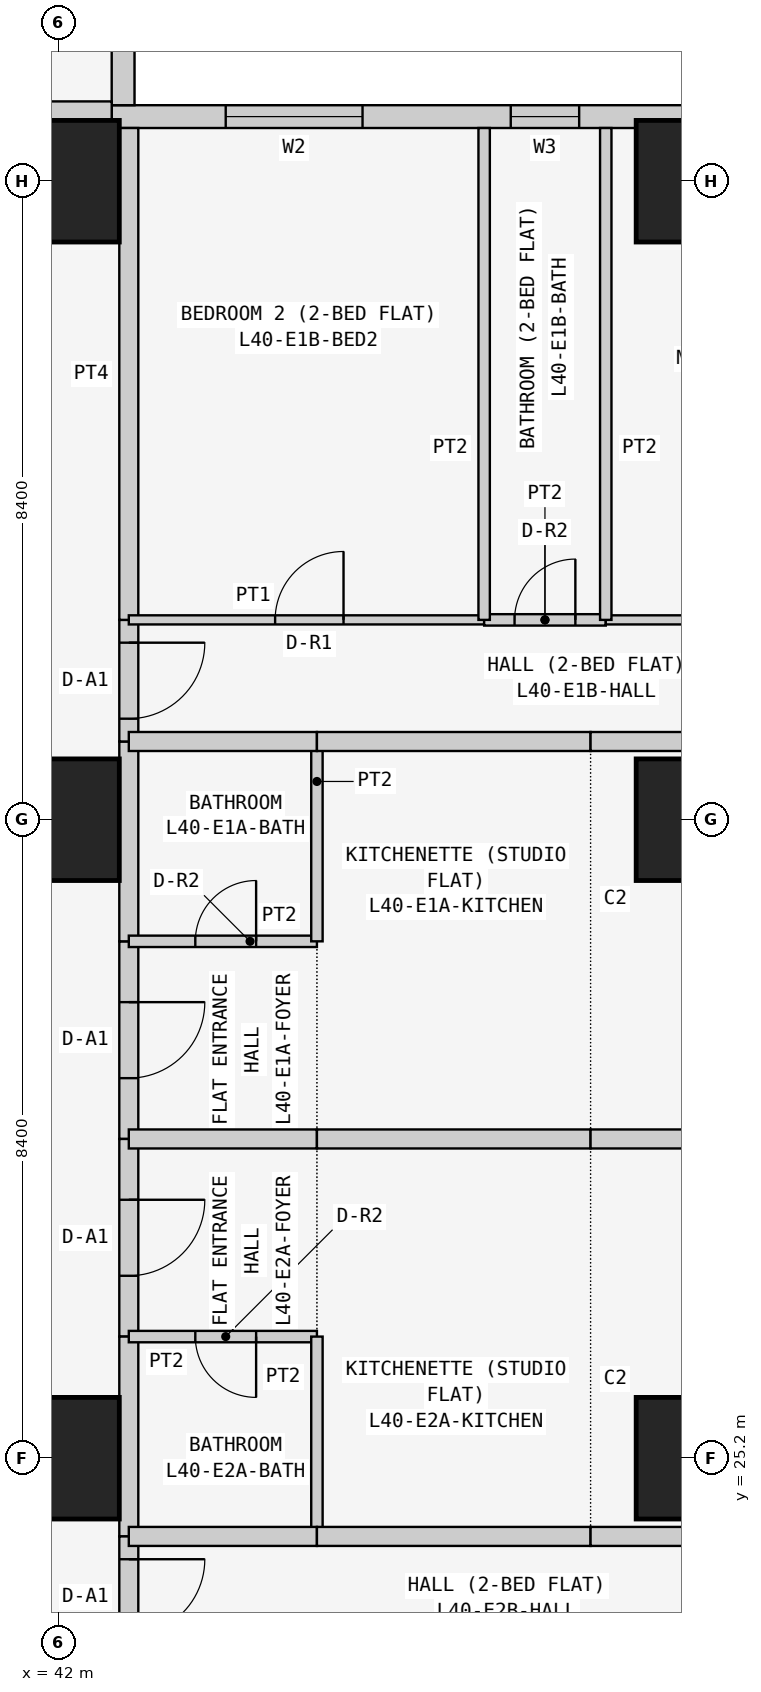
"""IFC4 building model, lengths in metres.
Left out: names, types, materials, properties, quantities, classifications, styles, units other than length and angle.
Written with IfcOpenShell. Run it as: python <this file> out.ifc"""

import sys

from ifc_helpers import new_model, si_unit, direction, frame, frame_2d, origin, origin_2d, place, context, subcontext, project, spatial, rectangle, extrude, element, fill, save


model = new_model("IFC4")
c1 = context("Model", 3, precision=1e-05, world=origin(), true_north=direction((0.0, 1.0)))
c2 = subcontext(c1, "Body", "Model", "MODEL_VIEW")
j1 = project(units=[si_unit("LENGTHUNIT", "METRE"), si_unit("PLANEANGLEUNIT", "RADIAN")], contexts=[c1])
p1 = place(None, origin())
s1 = spatial("IfcSite", under=j1, at=p1, CompositionType="ELEMENT")
p2 = place(p1, origin())
s2 = spatial("IfcBuilding", under=s1, at=p2, CompositionType="ELEMENT")
p3 = place(p2, frame((0.0, 0.0, 155.7)))
s3 = spatial("IfcBuildingStorey", under=s2, at=p3, CompositionType="ELEMENT", Elevation=155.7)
for number, where, z_axis, x_axis in (
    (1, (42.0, 25.2, 0.0), (0.0, 0.0, 1.0), (1.0, 0.0, 0.0)),
    (2, (42.0, 33.6, 0.0), (0.0, 0.0, 1.0), (1.0, 0.0, 0.0)),
    (3, (42.0, 42.0, 0.0), (0.0, 0.0, 1.0), (1.0, 0.0, 0.0)),
    (4, (50.4, 25.2, 0.0), (0.0, 0.0, 1.0), (1.0, 0.0, 0.0)),
    (5, (50.4, 33.6, 0.0), (0.0, 0.0, 1.0), (1.0, 0.0, 0.0)),
    (6, (50.4, 42.0, 0.0), (0.0, 0.0, 1.0), (1.0, 0.0, 0.0)),
):
    element("IfcColumn", number, at=place(p3, frame(where, z_axis=z_axis, x_axis=x_axis)), inside=s3, PredefinedType="COLUMN", context=c2, shape_type="SweptSolid", body=[
        extrude(rectangle(XDim=1.6, YDim=1.6, at=origin_2d()), origin(), (0.0, 0.0, 1.0), 3.6),
    ])
p4 = place(p3, frame((58.4, 42.85, 0.0), z_axis=(0.0, 0.0, 1.0), x_axis=(-1.0, 0.0, 0.0)))
e7 = element("IfcWall", 7, at=p4, inside=s3, PredefinedType="SOLIDWALL", context=c2, shape_type="SweptSolid", body=[
    extrude(rectangle(XDim=15.7, YDim=0.3, at=frame_2d((7.85, 0.0))), origin(), (0.0, 0.0, 1.0), 3.45),
])
p5 = place(p4, frame((12.4, 0.0, 0.9)))
e8 = element("IfcOpeningElement", 8, at=p5, cuts=e7, PredefinedType="OPENING", context=c2, shape_type="SweptSolid", body=[
    extrude(rectangle(XDim=1.8, YDim=1.5, at=frame_2d((0.9, 0.75))), frame((0.0, 0.16, 0.0), z_axis=(0.0, -1.0, 0.0), x_axis=(1.0, 0.0, 0.0)), (0.0, 0.0, 1.0), 0.32),
])
p6 = place(p4, frame((9.55, 0.0, 1.5)))
e9 = element("IfcOpeningElement", 9, at=p6, cuts=e7, PredefinedType="OPENING", context=c2, shape_type="SweptSolid", body=[
    extrude(rectangle(XDim=0.9, YDim=0.7, at=frame_2d((0.45, 0.35))), frame((0.0, 0.16, 0.0), z_axis=(0.0, -1.0, 0.0), x_axis=(1.0, 0.0, 0.0)), (0.0, 0.0, 1.0), 0.32),
])
p7 = place(p4, frame((5.1, 0.0, 0.9)))
e10 = element("IfcOpeningElement", 10, at=p7, cuts=e7, PredefinedType="OPENING", context=c2, shape_type="SweptSolid", body=[
    extrude(rectangle(XDim=1.8, YDim=1.5, at=frame_2d((0.9, 0.75))), frame((0.0, 0.16, 0.0), z_axis=(0.0, -1.0, 0.0), x_axis=(1.0, 0.0, 0.0)), (0.0, 0.0, 1.0), 0.32),
])
p8 = place(p4, frame((2.0, 0.0, 0.0)))
e11 = element("IfcOpeningElement", 11, at=p8, cuts=e7, PredefinedType="OPENING", context=c2, shape_type="SweptSolid", body=[
    extrude(rectangle(XDim=0.9, YDim=2.4, at=frame_2d((0.45, 1.2))), frame((0.0, 0.16, 0.0), z_axis=(0.0, -1.0, 0.0), x_axis=(1.0, 0.0, 0.0)), (0.0, 0.0, 1.0), 0.32),
])
p9 = place(p4, frame((0.7, 0.0, 0.9)))
e12 = element("IfcOpeningElement", 12, at=p9, cuts=e7, PredefinedType="OPENING", context=c2, shape_type="SweptSolid", body=[
    extrude(rectangle(XDim=1.2, YDim=1.5, at=frame_2d((0.6, 0.75))), frame((0.0, 0.16, 0.0), z_axis=(0.0, -1.0, 0.0), x_axis=(1.0, 0.0, 0.0)), (0.0, 0.0, 1.0), 0.32),
])
p10 = place(p3, frame((42.85, 43.0, 0.0), z_axis=(0.0, 0.0, 1.0), x_axis=(0.0, 1.0, 0.0)))
e13 = element("IfcWall", 13, at=p10, inside=s3, PredefinedType="SOLIDWALL", context=c2, shape_type="SweptSolid", body=[
    extrude(rectangle(XDim=7.0, YDim=0.3, at=frame_2d((3.5, 0.0))), origin(), (0.0, 0.0, 1.0), 3.45),
])
p11 = place(p10, frame((1.5, 0.0, 0.9)))
e14 = element("IfcOpeningElement", 14, at=p11, cuts=e13, PredefinedType="OPENING", context=c2, shape_type="SweptSolid", body=[
    extrude(rectangle(XDim=2.4, YDim=1.5, at=frame_2d((1.2, 0.75))), frame((0.0, 0.16, 0.0), z_axis=(0.0, -1.0, 0.0), x_axis=(1.0, 0.0, 0.0)), (0.0, 0.0, 1.0), 0.32),
])
p12 = place(p10, frame((5.05, 0.0, 0.9)))
e15 = element("IfcOpeningElement", 15, at=p12, cuts=e13, PredefinedType="OPENING", context=c2, shape_type="SweptSolid", body=[
    extrude(rectangle(XDim=1.2, YDim=1.5, at=frame_2d((0.6, 0.75))), frame((0.0, 0.16, 0.0), z_axis=(0.0, -1.0, 0.0), x_axis=(1.0, 0.0, 0.0)), (0.0, 0.0, 1.0), 0.32),
])
p13 = place(p3, frame((35.829, 42.925, 0.0), z_axis=(0.0, 0.0, 1.0), x_axis=(1.0, 0.0, 0.0)))
e16 = element("IfcWall", 16, at=p13, inside=s3, PredefinedType="PARTITIONING", context=c2, shape_type="SweptSolid", body=[
    extrude(rectangle(XDim=6.871, YDim=0.25, at=frame_2d((3.436, 0.0))), origin(), (0.0, 0.0, 1.0), 3.45),
])
p14 = place(p3, frame((42.925, 32.0, 0.0), z_axis=(0.0, 0.0, 1.0), x_axis=(0.0, -1.0, 0.0)))
e17 = element("IfcWall", 17, at=p14, inside=s3, PredefinedType="PARTITIONING", context=c2, shape_type="SweptSolid", body=[
    extrude(rectangle(XDim=2.6, YDim=0.25, at=frame_2d((1.3, 0.0))), origin(), (0.0, 0.0, 1.0), 3.45),
])
p15 = place(p14, frame((0.8, 0.0, 0.0)))
e18 = element("IfcOpeningElement", 18, at=p15, cuts=e17, PredefinedType="OPENING", context=c2, shape_type="SweptSolid", body=[
    extrude(rectangle(XDim=1.0, YDim=2.1, at=frame_2d((0.5, 1.05))), frame((0.0, 0.135, 0.0), z_axis=(0.0, -1.0, 0.0), x_axis=(1.0, 0.0, 0.0)), (0.0, 0.0, 1.0), 0.27),
])
p16 = place(p3, frame((42.925, 34.629, 0.0), z_axis=(0.0, 0.0, 1.0), x_axis=(0.0, -1.0, 0.0)))
e19 = element("IfcWall", 19, at=p16, inside=s3, PredefinedType="PARTITIONING", context=c2, shape_type="SweptSolid", body=[
    extrude(rectangle(XDim=2.629, YDim=0.25, at=frame_2d((1.314, 0.0))), origin(), (0.0, 0.0, 1.0), 3.45),
])
p17 = place(p3, frame((42.925, 36.229, 0.0), z_axis=(0.0, 0.0, 1.0), x_axis=(0.0, -1.0, 0.0)))
e20 = element("IfcWall", 20, at=p17, inside=s3, PredefinedType="PARTITIONING", context=c2, shape_type="SweptSolid", body=[
    extrude(rectangle(XDim=1.6, YDim=0.25, at=frame_2d((0.8, 0.0))), origin(), (0.0, 0.0, 1.0), 3.45),
])
p18 = place(p17, frame((0.3, 0.0, 0.0)))
e21 = element("IfcOpeningElement", 21, at=p18, cuts=e20, PredefinedType="OPENING", context=c2, shape_type="SweptSolid", body=[
    extrude(rectangle(XDim=1.0, YDim=2.1, at=frame_2d((0.5, 1.05))), frame((0.0, 0.135, 0.0), z_axis=(0.0, -1.0, 0.0), x_axis=(1.0, 0.0, 0.0)), (0.0, 0.0, 1.0), 0.27),
])
p19 = place(p3, frame((42.925, 42.7, 0.0), z_axis=(0.0, 0.0, 1.0), x_axis=(0.0, -1.0, 0.0)))
e22 = element("IfcWall", 22, at=p19, inside=s3, PredefinedType="PARTITIONING", context=c2, shape_type="SweptSolid", body=[
    extrude(rectangle(XDim=6.471, YDim=0.25, at=frame_2d((3.235, 0.0))), origin(), (0.0, 0.0, 1.0), 3.45),
])
p20 = place(p3, frame((42.925, 29.4, 0.0), z_axis=(0.0, 0.0, 1.0), x_axis=(0.0, -1.0, 0.0)))
e23 = element("IfcWall", 23, at=p20, inside=s3, PredefinedType="PARTITIONING", context=c2, shape_type="SweptSolid", body=[
    extrude(rectangle(XDim=2.6, YDim=0.25, at=frame_2d((1.3, 0.0))), origin(), (0.0, 0.0, 1.0), 3.45),
])
p21 = place(p20, frame((0.8, 0.0, 0.0)))
e24 = element("IfcOpeningElement", 24, at=p21, cuts=e23, PredefinedType="OPENING", context=c2, shape_type="SweptSolid", body=[
    extrude(rectangle(XDim=1.0, YDim=2.1, at=frame_2d((0.5, 1.05))), frame((0.0, 0.135, 0.0), z_axis=(0.0, -1.0, 0.0), x_axis=(1.0, 0.0, 0.0)), (0.0, 0.0, 1.0), 0.27),
])
p22 = place(p3, frame((42.925, 26.8, 0.0), z_axis=(0.0, 0.0, 1.0), x_axis=(0.0, -1.0, 0.0)))
e25 = element("IfcWall", 25, at=p22, inside=s3, PredefinedType="PARTITIONING", context=c2, shape_type="SweptSolid", body=[
    extrude(rectangle(XDim=2.629, YDim=0.25, at=frame_2d((1.314, 0.0))), origin(), (0.0, 0.0, 1.0), 3.45),
])
p23 = place(p3, frame((42.925, 24.171, 0.0), z_axis=(0.0, 0.0, 1.0), x_axis=(0.0, -1.0, 0.0)))
e26 = element("IfcWall", 26, at=p23, inside=s3, PredefinedType="PARTITIONING", context=c2, shape_type="SweptSolid", body=[
    extrude(rectangle(XDim=1.6, YDim=0.25, at=frame_2d((0.8, 0.0))), origin(), (0.0, 0.0, 1.0), 3.45),
])
p24 = place(p23, frame((0.3, 0.0, 0.0)))
e27 = element("IfcOpeningElement", 27, at=p24, cuts=e26, PredefinedType="OPENING", context=c2, shape_type="SweptSolid", body=[
    extrude(rectangle(XDim=1.0, YDim=2.1, at=frame_2d((0.5, 1.05))), frame((0.0, 0.135, 0.0), z_axis=(0.0, -1.0, 0.0), x_axis=(1.0, 0.0, 0.0)), (0.0, 0.0, 1.0), 0.27),
])
p25 = place(p3, frame((45.4, 32.0, 0.0), z_axis=(0.0, 0.0, 1.0), x_axis=(-1.0, 0.0, 0.0)))
e28 = element("IfcWall", 28, at=p25, inside=s3, PredefinedType="PARTITIONING", context=c2, shape_type="SweptSolid", body=[
    extrude(rectangle(XDim=2.475, YDim=0.15, at=frame_2d((1.237, 0.0))), origin(), (0.0, 0.0, 1.0), 3.45),
])
p26 = place(p25, frame((0.8, 0.0, 0.0)))
e29 = element("IfcOpeningElement", 29, at=p26, cuts=e28, PredefinedType="OPENING", context=c2, shape_type="SweptSolid", body=[
    extrude(rectangle(XDim=0.8, YDim=2.1, at=frame_2d((0.4, 1.05))), frame((0.0, 0.085, 0.0), z_axis=(0.0, -1.0, 0.0), x_axis=(1.0, 0.0, 0.0)), (0.0, 0.0, 1.0), 0.17),
])
p27 = place(p3, frame((42.925, 29.4, 0.0), z_axis=(0.0, 0.0, 1.0), x_axis=(1.0, 0.0, 0.0)))
e30 = element("IfcWall", 30, at=p27, inside=s3, PredefinedType="PARTITIONING", context=c2, shape_type="SweptSolid", body=[
    extrude(rectangle(XDim=2.475, YDim=0.25, at=frame_2d((1.237, 0.0))), origin(), (0.0, 0.0, 1.0), 3.45),
])
p28 = place(p3, frame((45.4, 32.0, 0.0), z_axis=(0.0, 0.0, 1.0), x_axis=(0.0, 1.0, 0.0)))
e31 = element("IfcWall", 31, at=p28, inside=s3, PredefinedType="PARTITIONING", context=c2, shape_type="SweptSolid", body=[
    extrude(rectangle(XDim=2.629, YDim=0.15, at=frame_2d((1.314, 0.0))), origin(), (0.0, 0.0, 1.0), 3.45),
])
p29 = place(p3, frame((45.4, 34.629, 0.0), z_axis=(0.0, 0.0, 1.0), x_axis=(-1.0, 0.0, 0.0)))
e32 = element("IfcWall", 32, at=p29, inside=s3, PredefinedType="PARTITIONING", context=c2, shape_type="SweptSolid", body=[
    extrude(rectangle(XDim=2.475, YDim=0.25, at=frame_2d((1.237, 0.0))), origin(), (0.0, 0.0, 1.0), 3.45),
])
for number, where, z_axis, x_axis in (
    (33, (49.0, 34.629, 0.0), (0.0, 0.0, 1.0), (-1.0, 0.0, 0.0)),
    (34, (45.4, 29.4, 0.0), (0.0, 0.0, 1.0), (1.0, 0.0, 0.0)),
):
    element("IfcWall", number, at=place(p3, frame(where, z_axis=z_axis, x_axis=x_axis)), inside=s3, PredefinedType="PARTITIONING", context=c2, shape_type="SweptSolid", body=[
        extrude(rectangle(XDim=3.6, YDim=0.25, at=frame_2d((1.8, 0.0))), origin(), (0.0, 0.0, 1.0), 3.45),
    ])
p30 = place(p3, frame((55.3, 34.629, 0.0), z_axis=(0.0, 0.0, 1.0), x_axis=(-1.0, 0.0, 0.0)))
e35 = element("IfcWall", 35, at=p30, inside=s3, PredefinedType="PARTITIONING", context=c2, shape_type="SweptSolid", body=[
    extrude(rectangle(XDim=6.3, YDim=0.25, at=frame_2d((3.15, 0.0))), origin(), (0.0, 0.0, 1.0), 3.45),
])
p31 = place(p3, frame((49.0, 29.4, 0.0), z_axis=(0.0, 0.0, 1.0), x_axis=(1.0, 0.0, 0.0)))
e36 = element("IfcWall", 36, at=p31, inside=s3, PredefinedType="PARTITIONING", context=c2, shape_type="SweptSolid", body=[
    extrude(rectangle(XDim=10.45, YDim=0.25, at=frame_2d((5.225, 0.0))), origin(), (0.0, 0.0, 1.0), 3.45),
])
p32 = place(p3, frame((47.6, 36.229, 0.0), z_axis=(0.0, 0.0, 1.0), x_axis=(-1.0, 0.0, 0.0)))
e37 = element("IfcWall", 37, at=p32, inside=s3, PredefinedType="PARTITIONING", context=c2, shape_type="SweptSolid", body=[
    extrude(rectangle(XDim=4.675, YDim=0.12, at=frame_2d((2.337, 0.0))), origin(), (0.0, 0.0, 1.0), 3.45),
])
p33 = place(p32, frame((1.85, 0.0, 0.0)))
e38 = element("IfcOpeningElement", 38, at=p33, cuts=e37, PredefinedType="OPENING", context=c2, shape_type="SweptSolid", body=[
    extrude(rectangle(XDim=0.9, YDim=2.1, at=frame_2d((0.45, 1.05))), frame((0.0, 0.07, 0.0), z_axis=(0.0, -1.0, 0.0), x_axis=(1.0, 0.0, 0.0)), (0.0, 0.0, 1.0), 0.14),
])
p34 = place(p3, frame((49.2, 36.229, 0.0), z_axis=(0.0, 0.0, 1.0), x_axis=(-1.0, 0.0, 0.0)))
e39 = element("IfcWall", 39, at=p34, inside=s3, PredefinedType="PARTITIONING", context=c2, shape_type="SweptSolid", body=[
    extrude(rectangle(XDim=1.6, YDim=0.15, at=frame_2d((0.8, 0.0))), origin(), (0.0, 0.0, 1.0), 3.45),
])
p35 = place(p34, frame((0.4, 0.0, 0.0)))
e40 = element("IfcOpeningElement", 40, at=p35, cuts=e39, PredefinedType="OPENING", context=c2, shape_type="SweptSolid", body=[
    extrude(rectangle(XDim=0.8, YDim=2.1, at=frame_2d((0.4, 1.05))), frame((0.0, 0.085, 0.0), z_axis=(0.0, -1.0, 0.0), x_axis=(1.0, 0.0, 0.0)), (0.0, 0.0, 1.0), 0.17),
])
p36 = place(p3, frame((54.1, 36.229, 0.0), z_axis=(0.0, 0.0, 1.0), x_axis=(-1.0, 0.0, 0.0)))
e41 = element("IfcWall", 41, at=p36, inside=s3, PredefinedType="PARTITIONING", context=c2, shape_type="SweptSolid", body=[
    extrude(rectangle(XDim=4.9, YDim=0.12, at=frame_2d((2.45, 0.0))), origin(), (0.0, 0.0, 1.0), 3.45),
])
p37 = place(p36, frame((1.65, 0.0, 0.0)))
e42 = element("IfcOpeningElement", 42, at=p37, cuts=e41, PredefinedType="OPENING", context=c2, shape_type="SweptSolid", body=[
    extrude(rectangle(XDim=0.9, YDim=2.1, at=frame_2d((0.45, 1.05))), frame((0.0, 0.07, 0.0), z_axis=(0.0, -1.0, 0.0), x_axis=(1.0, 0.0, 0.0)), (0.0, 0.0, 1.0), 0.14),
])
for number, where, z_axis, x_axis in (
    (43, (47.6, 36.229, 0.0), (0.0, 0.0, 1.0), (0.0, 1.0, 0.0)),
    (44, (49.2, 36.229, 0.0), (0.0, 0.0, 1.0), (0.0, 1.0, 0.0)),
):
    element("IfcWall", number, at=place(p3, frame(where, z_axis=z_axis, x_axis=x_axis)), inside=s3, PredefinedType="PARTITIONING", context=c2, shape_type="SweptSolid", body=[
        extrude(rectangle(XDim=6.471, YDim=0.15, at=frame_2d((3.235, 0.0))), origin(), (0.0, 0.0, 1.0), 3.45),
    ])
p38 = place(p3, frame((45.4, 26.8, 0.0), z_axis=(0.0, 0.0, 1.0), x_axis=(-1.0, 0.0, 0.0)))
e45 = element("IfcWall", 45, at=p38, inside=s3, PredefinedType="PARTITIONING", context=c2, shape_type="SweptSolid", body=[
    extrude(rectangle(XDim=2.475, YDim=0.15, at=frame_2d((1.237, 0.0))), origin(), (0.0, 0.0, 1.0), 3.45),
])
p39 = place(p38, frame((0.8, 0.0, 0.0)))
e46 = element("IfcOpeningElement", 46, at=p39, cuts=e45, PredefinedType="OPENING", context=c2, shape_type="SweptSolid", body=[
    extrude(rectangle(XDim=0.8, YDim=2.1, at=frame_2d((0.4, 1.05))), frame((0.0, 0.085, 0.0), z_axis=(0.0, -1.0, 0.0), x_axis=(1.0, 0.0, 0.0)), (0.0, 0.0, 1.0), 0.17),
])
p40 = place(p3, frame((45.4, 26.8, 0.0), z_axis=(0.0, 0.0, 1.0), x_axis=(0.0, -1.0, 0.0)))
e47 = element("IfcWall", 47, at=p40, inside=s3, PredefinedType="PARTITIONING", context=c2, shape_type="SweptSolid", body=[
    extrude(rectangle(XDim=2.629, YDim=0.15, at=frame_2d((1.314, 0.0))), origin(), (0.0, 0.0, 1.0), 3.45),
])
p41 = place(p3, frame((45.4, 24.171, 0.0), z_axis=(0.0, 0.0, 1.0), x_axis=(-1.0, 0.0, 0.0)))
e48 = element("IfcWall", 48, at=p41, inside=s3, PredefinedType="PARTITIONING", context=c2, shape_type="SweptSolid", body=[
    extrude(rectangle(XDim=2.475, YDim=0.25, at=frame_2d((1.237, 0.0))), origin(), (0.0, 0.0, 1.0), 3.45),
])
p42 = place(p3, frame((49.0, 24.171, 0.0), z_axis=(0.0, 0.0, 1.0), x_axis=(-1.0, 0.0, 0.0)))
e49 = element("IfcWall", 49, at=p42, inside=s3, PredefinedType="PARTITIONING", context=c2, shape_type="SweptSolid", body=[
    extrude(rectangle(XDim=3.6, YDim=0.25, at=frame_2d((1.8, 0.0))), origin(), (0.0, 0.0, 1.0), 3.45),
])
p43 = place(p3, frame((55.3, 24.171, 0.0), z_axis=(0.0, 0.0, 1.0), x_axis=(-1.0, 0.0, 0.0)))
e50 = element("IfcWall", 50, at=p43, inside=s3, PredefinedType="PARTITIONING", context=c2, shape_type="SweptSolid", body=[
    extrude(rectangle(XDim=6.3, YDim=0.25, at=frame_2d((3.15, 0.0))), origin(), (0.0, 0.0, 1.0), 3.45),
])
p44 = place(p5, origin())
e51 = element("IfcWindow", 51, at=p44, inside=s3, PartitioningType="SINGLE_PANEL", PredefinedType="WINDOW", context=c2, shape_type="SweptSolid", body=[
    extrude(rectangle(XDim=1.8, YDim=1.5, at=frame_2d((0.9, 0.75))), frame((0.0, 0.03, 0.0), z_axis=(0.0, -1.0, 0.0), x_axis=(1.0, 0.0, 0.0)), (0.0, 0.0, 1.0), 0.06),
])
fill(e8, e51)
p45 = place(p6, origin())
e52 = element("IfcWindow", 52, at=p45, inside=s3, PartitioningType="SINGLE_PANEL", PredefinedType="WINDOW", context=c2, shape_type="SweptSolid", body=[
    extrude(rectangle(XDim=0.9, YDim=0.7, at=frame_2d((0.45, 0.35))), frame((0.0, 0.03, 0.0), z_axis=(0.0, -1.0, 0.0), x_axis=(1.0, 0.0, 0.0)), (0.0, 0.0, 1.0), 0.06),
])
fill(e9, e52)
p46 = place(p15, origin())
e53 = element("IfcDoor", 53, at=p46, inside=s3, OperationType="SINGLE_SWING_LEFT", PredefinedType="DOOR", context=c2, shape_type="SweptSolid", body=[
    extrude(rectangle(XDim=1.0, YDim=2.1, at=frame_2d((0.5, 1.05))), frame((0.0, 0.025, 0.0), z_axis=(0.0, -1.0, 0.0), x_axis=(1.0, 0.0, 0.0)), (0.0, 0.0, 1.0), 0.05),
])
fill(e18, e53)
p47 = place(p26, frame((0.8, 0.0, 0.0), z_axis=(0.0, 0.0, 1.0), x_axis=(-1.0, 0.0, 0.0)))
e54 = element("IfcDoor", 54, at=p47, inside=s3, OperationType="SINGLE_SWING_RIGHT", PredefinedType="DOOR", context=c2, shape_type="SweptSolid", body=[
    extrude(rectangle(XDim=0.8, YDim=2.1, at=frame_2d((0.4, 1.05))), frame((0.0, 0.025, 0.0), z_axis=(0.0, -1.0, 0.0), x_axis=(1.0, 0.0, 0.0)), (0.0, 0.0, 1.0), 0.05),
])
fill(e29, e54)
p48 = place(p18, origin())
e55 = element("IfcDoor", 55, at=p48, inside=s3, OperationType="SINGLE_SWING_LEFT", PredefinedType="DOOR", context=c2, shape_type="SweptSolid", body=[
    extrude(rectangle(XDim=1.0, YDim=2.1, at=frame_2d((0.5, 1.05))), frame((0.0, 0.025, 0.0), z_axis=(0.0, -1.0, 0.0), x_axis=(1.0, 0.0, 0.0)), (0.0, 0.0, 1.0), 0.05),
])
fill(e21, e55)
p49 = place(p33, frame((0.9, 0.0, 0.0), z_axis=(0.0, 0.0, 1.0), x_axis=(-1.0, 0.0, 0.0)))
e56 = element("IfcDoor", 56, at=p49, inside=s3, OperationType="SINGLE_SWING_RIGHT", PredefinedType="DOOR", context=c2, shape_type="SweptSolid", body=[
    extrude(rectangle(XDim=0.9, YDim=2.1, at=frame_2d((0.45, 1.05))), frame((0.0, 0.025, 0.0), z_axis=(0.0, -1.0, 0.0), x_axis=(1.0, 0.0, 0.0)), (0.0, 0.0, 1.0), 0.05),
])
fill(e38, e56)
p50 = place(p35, frame((0.8, 0.0, 0.0), z_axis=(0.0, 0.0, 1.0), x_axis=(-1.0, 0.0, 0.0)))
e57 = element("IfcDoor", 57, at=p50, inside=s3, OperationType="SINGLE_SWING_RIGHT", PredefinedType="DOOR", context=c2, shape_type="SweptSolid", body=[
    extrude(rectangle(XDim=0.8, YDim=2.1, at=frame_2d((0.4, 1.05))), frame((0.0, 0.025, 0.0), z_axis=(0.0, -1.0, 0.0), x_axis=(1.0, 0.0, 0.0)), (0.0, 0.0, 1.0), 0.05),
])
fill(e40, e57)
p51 = place(p21, origin())
e58 = element("IfcDoor", 58, at=p51, inside=s3, OperationType="SINGLE_SWING_LEFT", PredefinedType="DOOR", context=c2, shape_type="SweptSolid", body=[
    extrude(rectangle(XDim=1.0, YDim=2.1, at=frame_2d((0.5, 1.05))), frame((0.0, 0.025, 0.0), z_axis=(0.0, -1.0, 0.0), x_axis=(1.0, 0.0, 0.0)), (0.0, 0.0, 1.0), 0.05),
])
fill(e24, e58)
p52 = place(p39, origin())
e59 = element("IfcDoor", 59, at=p52, inside=s3, OperationType="SINGLE_SWING_LEFT", PredefinedType="DOOR", context=c2, shape_type="SweptSolid", body=[
    extrude(rectangle(XDim=0.8, YDim=2.1, at=frame_2d((0.4, 1.05))), frame((0.0, 0.025, 0.0), z_axis=(0.0, -1.0, 0.0), x_axis=(1.0, 0.0, 0.0)), (0.0, 0.0, 1.0), 0.05),
])
fill(e46, e59)
p53 = place(p24, origin())
e60 = element("IfcDoor", 60, at=p53, inside=s3, OperationType="SINGLE_SWING_LEFT", PredefinedType="DOOR", context=c2, shape_type="SweptSolid", body=[
    extrude(rectangle(XDim=1.0, YDim=2.1, at=frame_2d((0.5, 1.05))), frame((0.0, 0.025, 0.0), z_axis=(0.0, -1.0, 0.0), x_axis=(1.0, 0.0, 0.0)), (0.0, 0.0, 1.0), 0.05),
])
fill(e27, e60)
save(model, sys.argv[1])
